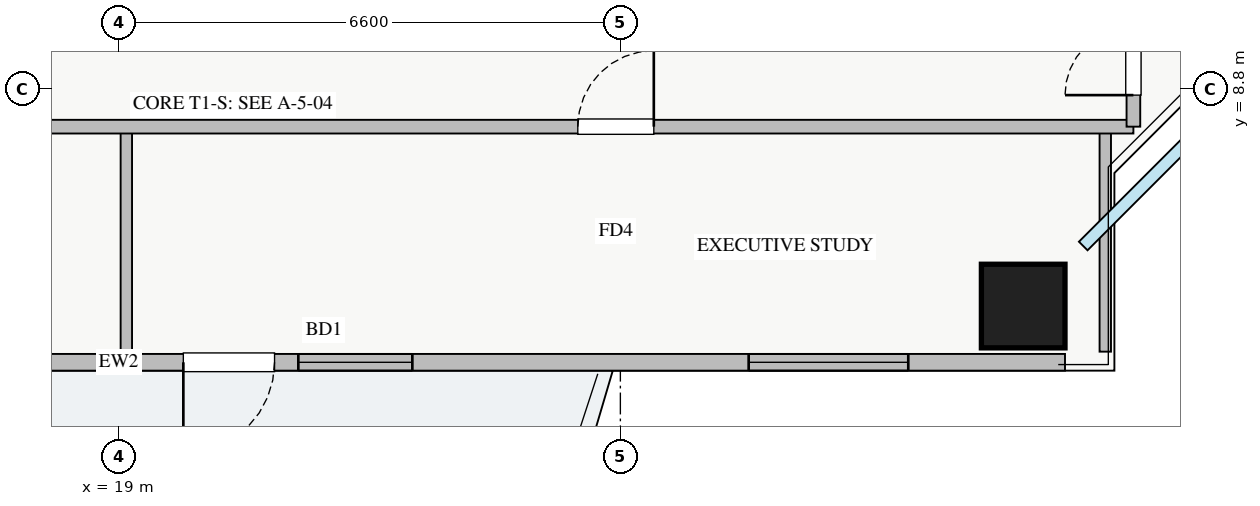
"""IFC4 building model, lengths in metres.
Left out: names, types, materials, properties, quantities, classifications, styles, units other than length and angle.
Written with IfcOpenShell. Run it as: python <this file> out.ifc"""

import sys

from ifc_helpers import new_model, si_unit, direction, frame, frame_2d, origin, origin_2d, place, context, subcontext, project, spatial, rectangle, extrude, source, transform, mapped, element, fill, save


model = new_model("IFC4")
c1 = context("Model", 3, precision=1e-05, world=origin(), true_north=direction((0.0, 1.0)))
c2 = subcontext(c1, "Body", "Model", "MODEL_VIEW")
j1 = project(units=[si_unit("LENGTHUNIT", "METRE"), si_unit("PLANEANGLEUNIT", "RADIAN")], contexts=[c1])
p1 = place(None, origin())
s1 = spatial("IfcSite", under=j1, at=p1, CompositionType="ELEMENT")
p2 = place(p1, origin())
s2 = spatial("IfcBuilding", under=s1, at=p2, CompositionType="ELEMENT")
p3 = place(p2, frame((0.0, 0.0, 129.5)))
s3 = spatial("IfcBuildingStorey", under=s2, at=p3, CompositionType="ELEMENT", Elevation=129.5)
m1 = source(origin(), c2, "Body", "SweptSolid", [
    extrude(rectangle(XDim=1.1, YDim=1.1, at=origin_2d()), origin(), (0.0, 0.0, 1.0), 3.25),
])
p4 = place(p3, frame((30.9, 5.95, 0.0), z_axis=(0.0, 0.0, 1.0), x_axis=(1.0, 0.0, 0.0)))
e1 = element("IfcColumn", 1, at=p4, inside=s3, PredefinedType="COLUMN", context=c2, shape_type="MappedRepresentation", body=[
    mapped(m1, transform((0.0, 0.0, 0.0), x_axis=(1.0, 0.0, 0.0), y_axis=(0.0, 1.0, 0.0), z_axis=(0.0, 0.0, 1.0), scale=1.0)),
])
p5 = place(p3, frame((6.55, 5.21, 0.0), z_axis=(0.0, 0.0, 1.0), x_axis=(1.0, 0.0, 0.0)))
e2 = element("IfcWall", 2, at=p5, inside=s3, PredefinedType="STANDARD", context=c2, shape_type="SweptSolid", body=[
    extrude(rectangle(XDim=24.9, YDim=0.22, at=frame_2d((12.45, 0.0))), origin(), (0.0, 0.0, 1.0), 2.61),
])
p6 = place(p5, frame((13.3, 0.0, 0.0)))
e3 = element("IfcOpeningElement", 3, at=p6, cuts=e2, PredefinedType="OPENING", context=c2, shape_type="SweptSolid", body=[
    extrude(rectangle(XDim=1.2, YDim=2.1, at=frame_2d((0.6, 1.05))), frame((0.0, 0.12, 0.0), z_axis=(0.0, -1.0, 0.0), x_axis=(1.0, 0.0, 0.0)), (0.0, 0.0, 1.0), 0.24),
])
p7 = place(p5, frame((0.343, 0.0, 0.9)))
e4 = element("IfcOpeningElement", 4, at=p7, cuts=e2, PredefinedType="OPENING", context=c2, shape_type="SweptSolid", body=[
    extrude(rectangle(XDim=1.5, YDim=1.5, at=frame_2d((0.75, 0.75))), frame((0.0, 0.12, 0.0), z_axis=(0.0, -1.0, 0.0), x_axis=(1.0, 0.0, 0.0)), (0.0, 0.0, 1.0), 0.24),
])
p8 = place(p5, frame((8.438, 0.0, 0.9)))
e5 = element("IfcOpeningElement", 5, at=p8, cuts=e2, PredefinedType="OPENING", context=c2, shape_type="SweptSolid", body=[
    extrude(rectangle(XDim=1.8, YDim=1.45, at=frame_2d((0.9, 0.725))), frame((0.0, 0.12, 0.0), z_axis=(0.0, -1.0, 0.0), x_axis=(1.0, 0.0, 0.0)), (0.0, 0.0, 1.0), 0.24),
])
p9 = place(p5, frame((14.813, 0.0, 0.9)))
e6 = element("IfcOpeningElement", 6, at=p9, cuts=e2, PredefinedType="OPENING", context=c2, shape_type="SweptSolid", body=[
    extrude(rectangle(XDim=1.5, YDim=1.45, at=frame_2d((0.75, 0.725))), frame((0.0, 0.12, 0.0), z_axis=(0.0, -1.0, 0.0), x_axis=(1.0, 0.0, 0.0)), (0.0, 0.0, 1.0), 0.24),
])
p10 = place(p5, frame((20.738, 0.0, 0.9)))
e7 = element("IfcOpeningElement", 7, at=p10, cuts=e2, PredefinedType="OPENING", context=c2, shape_type="SweptSolid", body=[
    extrude(rectangle(XDim=2.1, YDim=1.48, at=frame_2d((1.05, 0.74))), frame((0.0, 0.12, 0.0), z_axis=(0.0, -1.0, 0.0), x_axis=(1.0, 0.0, 0.0)), (0.0, 0.0, 1.0), 0.24),
])
p11 = place(p5, frame((4.122, 0.0, 0.9)))
e8 = element("IfcOpeningElement", 8, at=p11, cuts=e2, PredefinedType="OPENING", context=c2, shape_type="SweptSolid", body=[
    extrude(rectangle(XDim=2.4, YDim=1.5, at=frame_2d((1.2, 0.75))), frame((0.0, 0.12, 0.0), z_axis=(0.0, -1.0, 0.0), x_axis=(1.0, 0.0, 0.0)), (0.0, 0.0, 1.0), 0.24),
])
p12 = place(p3, frame((19.1, 5.35, 0.0), z_axis=(0.0, 0.0, 1.0), x_axis=(0.0, 1.0, 0.0)))
e9 = element("IfcWall", 9, at=p12, inside=s3, PredefinedType="PARTITIONING", context=c2, shape_type="SweptSolid", body=[
    extrude(rectangle(XDim=2.96, YDim=0.15, at=frame_2d((1.48, 0.0))), origin(), (0.0, 0.0, 1.0), 2.765),
])
p13 = place(p3, frame((31.98, 5.35, 0.0), z_axis=(0.0, 0.0, 1.0), x_axis=(0.0, 1.0, 0.0)))
e10 = element("IfcWall", 10, at=p13, inside=s3, PredefinedType="PARTITIONING", context=c2, shape_type="SweptSolid", body=[
    extrude(rectangle(XDim=2.96, YDim=0.15, at=frame_2d((1.48, 0.0))), origin(), (0.0, 0.0, 1.0), 3.07),
])
p14 = place(p3, frame((8.72, 8.31, 0.0), z_axis=(0.0, 0.0, 1.0), x_axis=(1.0, 0.0, 0.0)))
e11 = element("IfcWall", 11, at=p14, inside=s3, PredefinedType="PARTITIONING", context=c2, shape_type="SweptSolid", body=[
    extrude(rectangle(XDim=23.63, YDim=0.18, at=frame_2d((11.815, 0.0))), origin(), (0.0, 0.0, 1.0), 3.07),
])
p15 = place(p14, frame((4.69, 0.0, 0.0)))
e12 = element("IfcOpeningElement", 12, at=p15, cuts=e11, PredefinedType="OPENING", context=c2, shape_type="SweptSolid", body=[
    extrude(rectangle(XDim=1.0, YDim=2.05, at=frame_2d((0.5, 1.025))), frame((0.0, 0.1, 0.0), z_axis=(0.0, -1.0, 0.0), x_axis=(1.0, 0.0, 0.0)), (0.0, 0.0, 1.0), 0.2),
])
p16 = place(p14, frame((16.32, 0.0, 0.0)))
e13 = element("IfcOpeningElement", 13, at=p16, cuts=e11, PredefinedType="OPENING", context=c2, shape_type="SweptSolid", body=[
    extrude(rectangle(XDim=1.0, YDim=2.05, at=frame_2d((0.5, 1.025))), frame((0.0, 0.1, 0.0), z_axis=(0.0, -1.0, 0.0), x_axis=(1.0, 0.0, 0.0)), (0.0, 0.0, 1.0), 0.2),
])
p17 = place(p3, frame((32.35, 8.31, 0.0), z_axis=(0.0, 0.0, 1.0), x_axis=(0.0, 1.0, 0.0)))
e14 = element("IfcWall", 14, at=p17, inside=s3, PredefinedType="PARTITIONING", context=c2, shape_type="SweptSolid", body=[
    extrude(rectangle(XDim=29.37, YDim=0.18, at=frame_2d((14.685, 0.0))), origin(), (0.0, 0.0, 1.0), 3.07),
])
p18 = place(p17, frame((28.06, 0.0, 0.0)))
e15 = element("IfcOpeningElement", 15, at=p18, cuts=e14, PredefinedType="OPENING", context=c2, shape_type="SweptSolid", body=[
    extrude(rectangle(XDim=0.9, YDim=2.05, at=frame_2d((0.45, 1.025))), frame((0.0, 0.1, 0.0), z_axis=(0.0, -1.0, 0.0), x_axis=(1.0, 0.0, 0.0)), (0.0, 0.0, 1.0), 0.2),
])
p19 = place(p17, frame((0.415, 0.0, 0.0)))
e16 = element("IfcOpeningElement", 16, at=p19, cuts=e14, PredefinedType="OPENING", context=c2, shape_type="SweptSolid", body=[
    extrude(rectangle(XDim=0.9, YDim=2.05, at=frame_2d((0.45, 1.025))), frame((0.0, 0.1, 0.0), z_axis=(0.0, -1.0, 0.0), x_axis=(1.0, 0.0, 0.0)), (0.0, 0.0, 1.0), 0.2),
])
p20 = place(p17, frame((5.295, 0.0, 0.0)))
e17 = element("IfcOpeningElement", 17, at=p20, cuts=e14, PredefinedType="OPENING", context=c2, shape_type="SweptSolid", body=[
    extrude(rectangle(XDim=1.0, YDim=2.05, at=frame_2d((0.5, 1.025))), frame((0.0, 0.1, 0.0), z_axis=(0.0, -1.0, 0.0), x_axis=(1.0, 0.0, 0.0)), (0.0, 0.0, 1.0), 0.2),
])
p21 = place(p17, frame((11.645, 0.0, 0.0)))
e18 = element("IfcOpeningElement", 18, at=p21, cuts=e14, PredefinedType="OPENING", context=c2, shape_type="SweptSolid", body=[
    extrude(rectangle(XDim=1.0, YDim=2.05, at=frame_2d((0.5, 1.025))), frame((0.0, 0.1, 0.0), z_axis=(0.0, -1.0, 0.0), x_axis=(1.0, 0.0, 0.0)), (0.0, 0.0, 1.0), 0.2),
])
p22 = place(p17, frame((20.835, 0.0, 0.0)))
e19 = element("IfcOpeningElement", 19, at=p22, cuts=e14, PredefinedType="OPENING", context=c2, shape_type="SweptSolid", body=[
    extrude(rectangle(XDim=1.0, YDim=2.05, at=frame_2d((0.5, 1.025))), frame((0.0, 0.1, 0.0), z_axis=(0.0, -1.0, 0.0), x_axis=(1.0, 0.0, 0.0)), (0.0, 0.0, 1.0), 0.2),
])
m2 = source(origin(), c2, "Body", "SweptSolid", [
    extrude(rectangle(XDim=1.2, YDim=2.1, at=frame_2d((0.6, 1.05))), frame((0.0, 0.025, 0.0), z_axis=(0.0, -1.0, 0.0), x_axis=(1.0, 0.0, 0.0)), (0.0, 0.0, 1.0), 0.05),
])
p23 = place(p6, frame((1.2, 0.0, 0.0), z_axis=(0.0, 0.0, 1.0), x_axis=(-1.0, 0.0, 0.0)))
e20 = element("IfcDoor", 20, at=p23, inside=s3, OperationType="SINGLE_SWING_LEFT", PredefinedType="DOOR", context=c2, shape_type="MappedRepresentation", body=[
    mapped(m2, transform((0.0, 0.0, 0.0), x_axis=(1.0, 0.0, 0.0), y_axis=(0.0, 1.0, 0.0), z_axis=(0.0, 0.0, 1.0), scale=1.0)),
])
fill(e3, e20)
m3 = source(origin(), c2, "Body", "SweptSolid", [
    extrude(rectangle(XDim=1.5, YDim=1.45, at=frame_2d((0.75, 0.725))), frame((0.0, 0.03, 0.0), z_axis=(0.0, -1.0, 0.0), x_axis=(1.0, 0.0, 0.0)), (0.0, 0.0, 1.0), 0.06),
])
p24 = place(p9, origin())
e21 = element("IfcWindow", 21, at=p24, inside=s3, PartitioningType="DOUBLE_PANEL_VERTICAL", PredefinedType="WINDOW", context=c2, shape_type="MappedRepresentation", body=[
    mapped(m3, transform((0.0, 0.0, 0.0), x_axis=(1.0, 0.0, 0.0), y_axis=(0.0, 1.0, 0.0), z_axis=(0.0, 0.0, 1.0), scale=1.0)),
])
fill(e6, e21)
m4 = source(origin(), c2, "Body", "SweptSolid", [
    extrude(rectangle(XDim=2.1, YDim=1.48, at=frame_2d((1.05, 0.74))), frame((0.0, 0.03, 0.0), z_axis=(0.0, -1.0, 0.0), x_axis=(1.0, 0.0, 0.0)), (0.0, 0.0, 1.0), 0.06),
])
p25 = place(p10, origin())
e22 = element("IfcWindow", 22, at=p25, inside=s3, PartitioningType="TRIPLE_PANEL_VERTICAL", PredefinedType="WINDOW", context=c2, shape_type="MappedRepresentation", body=[
    mapped(m4, transform((0.0, 0.0, 0.0), x_axis=(1.0, 0.0, 0.0), y_axis=(0.0, 1.0, 0.0), z_axis=(0.0, 0.0, 1.0), scale=1.0)),
])
fill(e7, e22)
m5 = source(origin(), c2, "Body", "SweptSolid", [
    extrude(rectangle(XDim=1.0, YDim=2.05, at=frame_2d((0.5, 1.025))), frame((0.0, 0.025, 0.0), z_axis=(0.0, -1.0, 0.0), x_axis=(1.0, 0.0, 0.0)), (0.0, 0.0, 1.0), 0.05),
])
p26 = place(p16, origin())
e23 = element("IfcDoor", 23, at=p26, inside=s3, OperationType="SINGLE_SWING_RIGHT", PredefinedType="DOOR", context=c2, shape_type="MappedRepresentation", body=[
    mapped(m5, transform((0.0, 0.0, 0.0), x_axis=(1.0, 0.0, 0.0), y_axis=(0.0, 1.0, 0.0), z_axis=(0.0, 0.0, 1.0), scale=1.0)),
])
fill(e13, e23)
m6 = source(origin(), c2, "Body", "SweptSolid", [
    extrude(rectangle(XDim=0.9, YDim=2.05, at=frame_2d((0.45, 1.025))), frame((0.0, 0.025, 0.0), z_axis=(0.0, -1.0, 0.0), x_axis=(1.0, 0.0, 0.0)), (0.0, 0.0, 1.0), 0.05),
])
p27 = place(p19, origin())
e24 = element("IfcDoor", 24, at=p27, inside=s3, OperationType="SINGLE_SWING_LEFT", PredefinedType="DOOR", context=c2, shape_type="MappedRepresentation", body=[
    mapped(m6, transform((0.0, 0.0, 0.0), x_axis=(1.0, 0.0, 0.0), y_axis=(0.0, 1.0, 0.0), z_axis=(0.0, 0.0, 1.0), scale=1.0)),
])
fill(e16, e24)
save(model, sys.argv[1])
